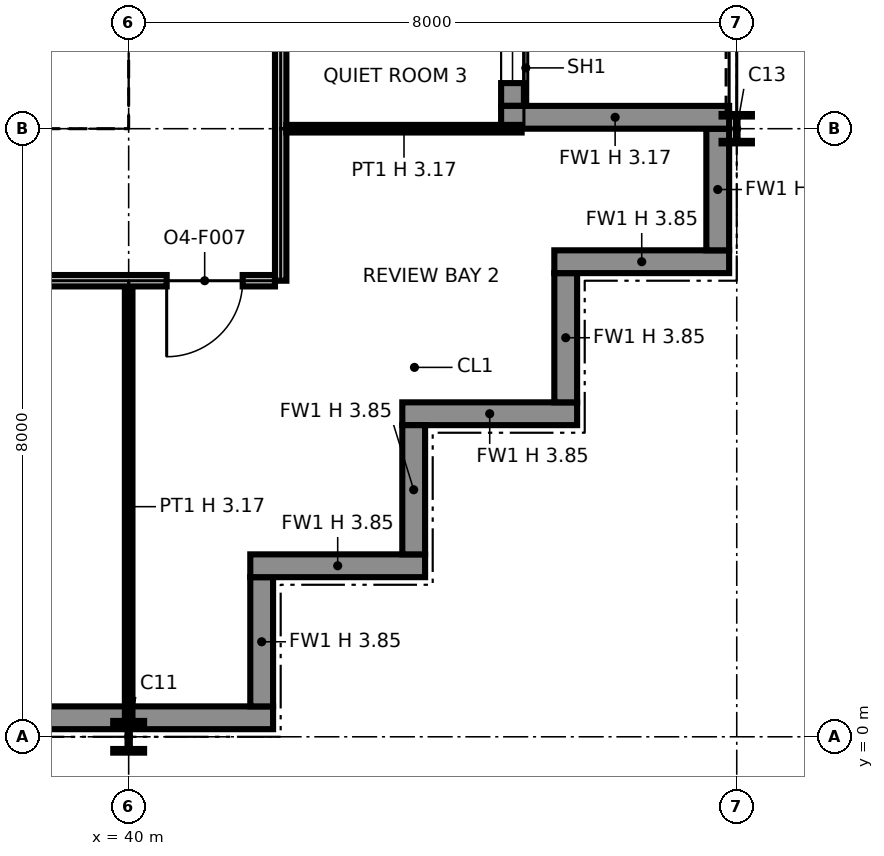
"""IFC4 building model, lengths in metres.
Left out: names, types, materials, properties, quantities, classifications, styles, units other than length and angle.
Written with IfcOpenShell. Run it as: python <this file> out.ifc"""

import sys

from ifc_helpers import new_model, si_unit, direction, frame, frame_2d, origin, origin_2d, place, context, subcontext, project, spatial, polyline, rectangle, i_section, outline, extrude, element, fill, save


model = new_model("IFC4")
c1 = context("Model", 3, precision=1e-05, world=origin(), true_north=direction((0.0, 1.0)))
c2 = subcontext(c1, "Body", "Model", "MODEL_VIEW")
j1 = project(units=[si_unit("LENGTHUNIT", "METRE"), si_unit("PLANEANGLEUNIT", "RADIAN")], contexts=[c1])
p1 = place(None, origin())
s1 = spatial("IfcSite", under=j1, at=p1, CompositionType="ELEMENT")
p2 = place(p1, origin())
s2 = spatial("IfcBuilding", under=s1, at=p2, CompositionType="ELEMENT")
p3 = place(p2, frame((0.0, 0.0, 221.0)))
s3 = spatial("IfcBuildingStorey", under=s2, at=p3, CompositionType="ELEMENT", Elevation=221.0)
p4 = place(p3, frame((40.0, 0.0, 0.0), z_axis=(0.0, 0.0, 1.0), x_axis=(1.0, 0.0, 0.0)))
e1 = element("IfcColumn", 1, at=p4, inside=s3, PredefinedType="COLUMN", context=c2, shape_type="SweptSolid", body=[
    extrude(i_section(OverallWidth=0.406, OverallDepth=0.417, WebThickness=0.03, FlangeThickness=0.048, at=origin_2d()), origin(), (0.0, 0.0, 1.0), 3.85),
])
p5 = place(p3, frame((40.0, 8.0, 0.0), z_axis=(0.0, 0.0, 1.0), x_axis=(1.0, 0.0, 0.0)))
e2 = element("IfcColumn", 2, at=p5, inside=s3, PredefinedType="COLUMN", context=c2, shape_type="SweptSolid", body=[
    extrude(i_section(OverallWidth=0.373, OverallDepth=0.368, WebThickness=0.015, FlangeThickness=0.024, at=origin_2d()), origin(), (0.0, 0.0, 1.0), 3.85),
])
p6 = place(p3, frame((48.0, 8.0, 0.0), z_axis=(0.0, 0.0, 1.0), x_axis=(1.0, 0.0, 0.0)))
e3 = element("IfcColumn", 3, at=p6, inside=s3, PredefinedType="COLUMN", context=c2, shape_type="SweptSolid", body=[
    extrude(i_section(OverallWidth=0.399, OverallDepth=0.386, WebThickness=0.021, FlangeThickness=0.033, at=origin_2d()), origin(), (0.0, 0.0, 1.0), 3.85),
])
p7 = place(p3, frame((32.0, 0.25, 0.0), z_axis=(0.0, 0.0, 1.0), x_axis=(1.0, 0.0, 0.0)))
e4 = element("IfcWall", 4, at=p7, inside=s3, PredefinedType="SOLIDWALL", context=c2, shape_type="SweptSolid", body=[
    extrude(rectangle(XDim=9.9, YDim=0.3, at=frame_2d((4.95, 0.0))), origin(), (0.0, 0.0, 1.0), 3.85),
])
p8 = place(p3, frame((41.75, 0.4, 0.0), z_axis=(0.0, 0.0, 1.0), x_axis=(0.0, 1.0, 0.0)))
e5 = element("IfcWall", 5, at=p8, inside=s3, PredefinedType="SOLIDWALL", context=c2, shape_type="SweptSolid", body=[
    extrude(rectangle(XDim=1.7, YDim=0.3, at=frame_2d((0.85, 0.0))), origin(), (0.0, 0.0, 1.0), 3.85),
])
p9 = place(p3, frame((41.6, 2.25, 0.0), z_axis=(0.0, 0.0, 1.0), x_axis=(1.0, 0.0, 0.0)))
e6 = element("IfcWall", 6, at=p9, inside=s3, PredefinedType="SOLIDWALL", context=c2, shape_type="SweptSolid", body=[
    extrude(rectangle(XDim=2.3, YDim=0.3, at=frame_2d((1.15, 0.0))), origin(), (0.0, 0.0, 1.0), 3.85),
])
p10 = place(p3, frame((43.75, 2.4, 0.0), z_axis=(0.0, 0.0, 1.0), x_axis=(0.0, 1.0, 0.0)))
e7 = element("IfcWall", 7, at=p10, inside=s3, PredefinedType="SOLIDWALL", context=c2, shape_type="SweptSolid", body=[
    extrude(rectangle(XDim=1.7, YDim=0.3, at=frame_2d((0.85, 0.0))), origin(), (0.0, 0.0, 1.0), 3.85),
])
p11 = place(p3, frame((43.6, 4.25, 0.0), z_axis=(0.0, 0.0, 1.0), x_axis=(1.0, 0.0, 0.0)))
e8 = element("IfcWall", 8, at=p11, inside=s3, PredefinedType="SOLIDWALL", context=c2, shape_type="SweptSolid", body=[
    extrude(rectangle(XDim=2.3, YDim=0.3, at=frame_2d((1.15, 0.0))), origin(), (0.0, 0.0, 1.0), 3.85),
])
p12 = place(p3, frame((45.75, 4.4, 0.0), z_axis=(0.0, 0.0, 1.0), x_axis=(0.0, 1.0, 0.0)))
e9 = element("IfcWall", 9, at=p12, inside=s3, PredefinedType="SOLIDWALL", context=c2, shape_type="SweptSolid", body=[
    extrude(rectangle(XDim=1.7, YDim=0.3, at=frame_2d((0.85, 0.0))), origin(), (0.0, 0.0, 1.0), 3.85),
])
p13 = place(p3, frame((45.6, 6.25, 0.0), z_axis=(0.0, 0.0, 1.0), x_axis=(1.0, 0.0, 0.0)))
e10 = element("IfcWall", 10, at=p13, inside=s3, PredefinedType="SOLIDWALL", context=c2, shape_type="SweptSolid", body=[
    extrude(rectangle(XDim=2.3, YDim=0.3, at=frame_2d((1.15, 0.0))), origin(), (0.0, 0.0, 1.0), 3.85),
])
p14 = place(p3, frame((47.75, 6.4, 0.0), z_axis=(0.0, 0.0, 1.0), x_axis=(0.0, 1.0, 0.0)))
e11 = element("IfcWall", 11, at=p14, inside=s3, PredefinedType="SOLIDWALL", context=c2, shape_type="SweptSolid", body=[
    extrude(rectangle(XDim=1.6, YDim=0.3, at=frame_2d((0.8, 0.0))), origin(), (0.0, 0.0, 1.0), 3.85),
])
p15 = place(p3, frame((45.05, 8.3, 0.0), z_axis=(0.0, 0.0, 1.0), x_axis=(0.0, 1.0, 0.0)))
e12 = element("IfcWall", 12, at=p15, inside=s3, PredefinedType="SOLIDWALL", context=c2, shape_type="SweptSolid", body=[
    extrude(rectangle(XDim=7.4, YDim=0.3, at=frame_2d((3.7, 0.0))), origin(), (0.0, 0.0, 1.0), 3.85),
])
p16 = place(p15, frame((0.3, 0.0, 0.9)))
e13 = element("IfcOpeningElement", 13, at=p16, cuts=e12, PredefinedType="OPENING", context=c2, shape_type="SweptSolid", body=[
    extrude(rectangle(XDim=2.8, YDim=2.2, at=frame_2d((1.4, 1.1))), frame((0.0, 0.16, 0.0), z_axis=(0.0, -1.0, 0.0), x_axis=(1.0, 0.0, 0.0)), (0.0, 0.0, 1.0), 0.32),
])
p17 = place(p15, frame((4.7, 0.0, 0.0)))
e14 = element("IfcOpeningElement", 14, at=p17, cuts=e12, PredefinedType="OPENING", context=c2, shape_type="SweptSolid", body=[
    extrude(rectangle(XDim=2.0, YDim=2.4, at=frame_2d((1.0, 1.2))), frame((0.0, 0.16, 0.0), z_axis=(0.0, -1.0, 0.0), x_axis=(1.0, 0.0, 0.0)), (0.0, 0.0, 1.0), 0.32),
])
p18 = place(p3, frame((47.9, 8.15, 0.0), z_axis=(0.0, 0.0, 1.0), x_axis=(-1.0, 0.0, 0.0)))
e15 = element("IfcWall", 15, at=p18, inside=s3, PredefinedType="SOLIDWALL", context=c2, shape_type="SweptSolid", body=[
    extrude(rectangle(XDim=3.0, YDim=0.3, at=frame_2d((1.5, 0.0))), origin(), (0.0, 0.0, 1.0), 3.171),
])
p19 = place(p3, frame((24.65, 8.75, 0.0), z_axis=(0.0, 0.0, 1.0), x_axis=(1.0, 0.0, 0.0)))
e16 = element("IfcWall", 16, at=p19, inside=s3, PredefinedType="PARTITIONING", context=c2, shape_type="SweptSolid", body=[
    extrude(outline(polyline([(0.0, 0.0), (14.7, 0.0), (14.7, 3.85), (7.438, 3.85), (7.438, 3.308), (7.262, 3.308), (7.261, 3.85), (0.0, 3.85), (0.0, 0.0)])), frame((0.0, 0.1, 0.0), z_axis=(0.0, -1.0, 0.0), x_axis=(1.0, 0.0, 0.0)), (0.0, 0.0, 1.0), 0.2),
])
p20 = place(p3, frame((39.25, 8.85, 0.0), z_axis=(0.0, 0.0, 1.0), x_axis=(0.0, 1.0, 0.0)))
e17 = element("IfcWall", 17, at=p20, inside=s3, PredefinedType="PARTITIONING", context=c2, shape_type="SweptSolid", body=[
    extrude(rectangle(XDim=6.3, YDim=0.2, at=frame_2d((3.15, 0.0))), origin(), (0.0, 0.0, 1.0), 3.85),
])
p21 = place(p3, frame((40.0, 0.13, 0.0), z_axis=(0.0, 0.0, 1.0), x_axis=(0.0, 1.0, 0.0)))
e18 = element("IfcWall", 18, at=p21, inside=s3, PredefinedType="PARTITIONING", context=c2, shape_type="SweptSolid", body=[
    extrude(rectangle(XDim=5.795, YDim=0.1, at=frame_2d((2.897, 0.0))), origin(), (0.0, 0.0, 1.0), 3.172),
])
p22 = place(p3, frame((6.075, 6.0, 0.0), z_axis=(0.0, 0.0, 1.0), x_axis=(1.0, 0.0, 0.0)))
e19 = element("IfcWall", 19, at=p22, inside=s3, PredefinedType="PARTITIONING", context=c2, shape_type="SweptSolid", body=[
    extrude(rectangle(XDim=35.85, YDim=0.15, at=frame_2d((17.925, 0.0))), origin(), (0.0, 0.0, 1.0), 3.85),
])
p23 = place(p22, frame((12.425, 0.0, 0.0), z_axis=(0.0, 0.0, 1.0), x_axis=(-1.0, 0.0, 0.0)))
e20 = element("IfcOpeningElement", 20, at=p23, cuts=e19, PredefinedType="OPENING", context=c2, shape_type="SweptSolid", body=[
    extrude(rectangle(XDim=1.0, YDim=2.1, at=frame_2d((0.5, 1.05))), frame((0.0, 0.085, 0.0), z_axis=(0.0, -1.0, 0.0), x_axis=(1.0, 0.0, 0.0)), (0.0, 0.0, 1.0), 0.17),
])
p24 = place(p22, frame((16.425, 0.0, 0.0), z_axis=(0.0, 0.0, 1.0), x_axis=(-1.0, 0.0, 0.0)))
e21 = element("IfcOpeningElement", 21, at=p24, cuts=e19, PredefinedType="OPENING", context=c2, shape_type="SweptSolid", body=[
    extrude(rectangle(XDim=1.0, YDim=2.1, at=frame_2d((0.5, 1.05))), frame((0.0, 0.085, 0.0), z_axis=(0.0, -1.0, 0.0), x_axis=(1.0, 0.0, 0.0)), (0.0, 0.0, 1.0), 0.17),
])
p25 = place(p22, frame((30.425, 0.0, 0.0), z_axis=(0.0, 0.0, 1.0), x_axis=(-1.0, 0.0, 0.0)))
e22 = element("IfcOpeningElement", 22, at=p25, cuts=e19, PredefinedType="OPENING", context=c2, shape_type="SweptSolid", body=[
    extrude(rectangle(XDim=1.0, YDim=2.1, at=frame_2d((0.5, 1.05))), frame((0.0, 0.085, 0.0), z_axis=(0.0, -1.0, 0.0), x_axis=(1.0, 0.0, 0.0)), (0.0, 0.0, 1.0), 0.17),
])
p26 = place(p22, frame((6.425, 0.0, 0.0), z_axis=(0.0, 0.0, 1.0), x_axis=(-1.0, 0.0, 0.0)))
e23 = element("IfcOpeningElement", 23, at=p26, cuts=e19, PredefinedType="OPENING", context=c2, shape_type="SweptSolid", body=[
    extrude(rectangle(XDim=1.0, YDim=2.1, at=frame_2d((0.5, 1.05))), frame((0.0, 0.085, 0.0), z_axis=(0.0, -1.0, 0.0), x_axis=(1.0, 0.0, 0.0)), (0.0, 0.0, 1.0), 0.17),
])
p27 = place(p22, frame((23.425, 0.0, 0.0), z_axis=(0.0, 0.0, 1.0), x_axis=(-1.0, 0.0, 0.0)))
e24 = element("IfcOpeningElement", 24, at=p27, cuts=e19, PredefinedType="OPENING", context=c2, shape_type="SweptSolid", body=[
    extrude(rectangle(XDim=1.0, YDim=2.1, at=frame_2d((0.5, 1.05))), frame((0.0, 0.085, 0.0), z_axis=(0.0, -1.0, 0.0), x_axis=(1.0, 0.0, 0.0)), (0.0, 0.0, 1.0), 0.17),
])
p28 = place(p22, frame((35.425, 0.0, 0.0), z_axis=(0.0, 0.0, 1.0), x_axis=(-1.0, 0.0, 0.0)))
e25 = element("IfcOpeningElement", 25, at=p28, cuts=e19, PredefinedType="OPENING", context=c2, shape_type="SweptSolid", body=[
    extrude(rectangle(XDim=1.0, YDim=2.1, at=frame_2d((0.5, 1.05))), frame((0.0, 0.085, 0.0), z_axis=(0.0, -1.0, 0.0), x_axis=(1.0, 0.0, 0.0)), (0.0, 0.0, 1.0), 0.17),
])
p29 = place(p3, frame((42.0, 6.0, 0.0), z_axis=(0.0, 0.0, 1.0), x_axis=(0.0, 1.0, 0.0)))
e26 = element("IfcWall", 26, at=p29, inside=s3, PredefinedType="PARTITIONING", context=c2, shape_type="SweptSolid", body=[
    extrude(outline(polyline([(0.0, 0.0), (11.925, 0.0), (11.925, 3.85), (10.3, 3.85), (10.298, 3.172), (9.702, 3.172), (9.7, 3.85), (6.3, 3.85), (6.298, 3.172), (5.702, 3.172), (5.7, 3.85), (2.3, 3.85), (2.298, 3.172), (1.702, 3.172), (1.7, 3.85), (0.0, 3.85), (0.0, 0.0)])), frame((0.0, 0.075, 0.0), z_axis=(0.0, -1.0, 0.0), x_axis=(1.0, 0.0, 0.0)), (0.0, 0.0, 1.0), 0.15),
])
p30 = place(p29, frame((4.5, 0.0, 0.0), z_axis=(0.0, 0.0, 1.0), x_axis=(-1.0, 0.0, 0.0)))
e27 = element("IfcOpeningElement", 27, at=p30, cuts=e26, PredefinedType="OPENING", context=c2, shape_type="SweptSolid", body=[
    extrude(rectangle(XDim=1.0, YDim=2.1, at=frame_2d((0.5, 1.05))), frame((0.0, 0.085, 0.0), z_axis=(0.0, -1.0, 0.0), x_axis=(1.0, 0.0, 0.0)), (0.0, 0.0, 1.0), 0.17),
])
p31 = place(p29, frame((8.5, 0.0, 0.0), z_axis=(0.0, 0.0, 1.0), x_axis=(-1.0, 0.0, 0.0)))
e28 = element("IfcOpeningElement", 28, at=p31, cuts=e26, PredefinedType="OPENING", context=c2, shape_type="SweptSolid", body=[
    extrude(rectangle(XDim=1.0, YDim=2.1, at=frame_2d((0.5, 1.05))), frame((0.0, 0.085, 0.0), z_axis=(0.0, -1.0, 0.0), x_axis=(1.0, 0.0, 0.0)), (0.0, 0.0, 1.0), 0.17),
])
p32 = place(p29, frame((11.5, 0.0, 0.0), z_axis=(0.0, 0.0, 1.0), x_axis=(-1.0, 0.0, 0.0)))
e29 = element("IfcOpeningElement", 29, at=p32, cuts=e26, PredefinedType="OPENING", context=c2, shape_type="SweptSolid", body=[
    extrude(rectangle(XDim=1.0, YDim=2.1, at=frame_2d((0.5, 1.05))), frame((0.0, 0.085, 0.0), z_axis=(0.0, -1.0, 0.0), x_axis=(1.0, 0.0, 0.0)), (0.0, 0.0, 1.0), 0.17),
])
p33 = place(p3, frame((42.075, 8.0, 0.0), z_axis=(0.0, 0.0, 1.0), x_axis=(1.0, 0.0, 0.0)))
e30 = element("IfcWall", 30, at=p33, inside=s3, PredefinedType="PARTITIONING", context=c2, shape_type="SweptSolid", body=[
    extrude(rectangle(XDim=3.095, YDim=0.1, at=frame_2d((1.547, 0.0))), origin(), (0.0, 0.0, 1.0), 3.172),
])
p34 = place(p16, origin())
e31 = element("IfcWindow", 31, at=p34, inside=s3, PartitioningType="SINGLE_PANEL", PredefinedType="WINDOW", context=c2, shape_type="SweptSolid", body=[
    extrude(rectangle(XDim=2.8, YDim=2.2, at=frame_2d((1.4, 1.1))), frame((0.0, 0.03, 0.0), z_axis=(0.0, -1.0, 0.0), x_axis=(1.0, 0.0, 0.0)), (0.0, 0.0, 1.0), 0.06),
])
fill(e13, e31)
p35 = place(p28, origin())
e32 = element("IfcDoor", 32, at=p35, inside=s3, OperationType="SINGLE_SWING_RIGHT", PredefinedType="DOOR", context=c2, shape_type="SweptSolid", body=[
    extrude(rectangle(XDim=1.0, YDim=2.1, at=frame_2d((0.5, 1.05))), frame((0.0, 0.025, 0.0), z_axis=(0.0, -1.0, 0.0), x_axis=(1.0, 0.0, 0.0)), (0.0, 0.0, 1.0), 0.05),
])
fill(e25, e32)
save(model, sys.argv[1])
